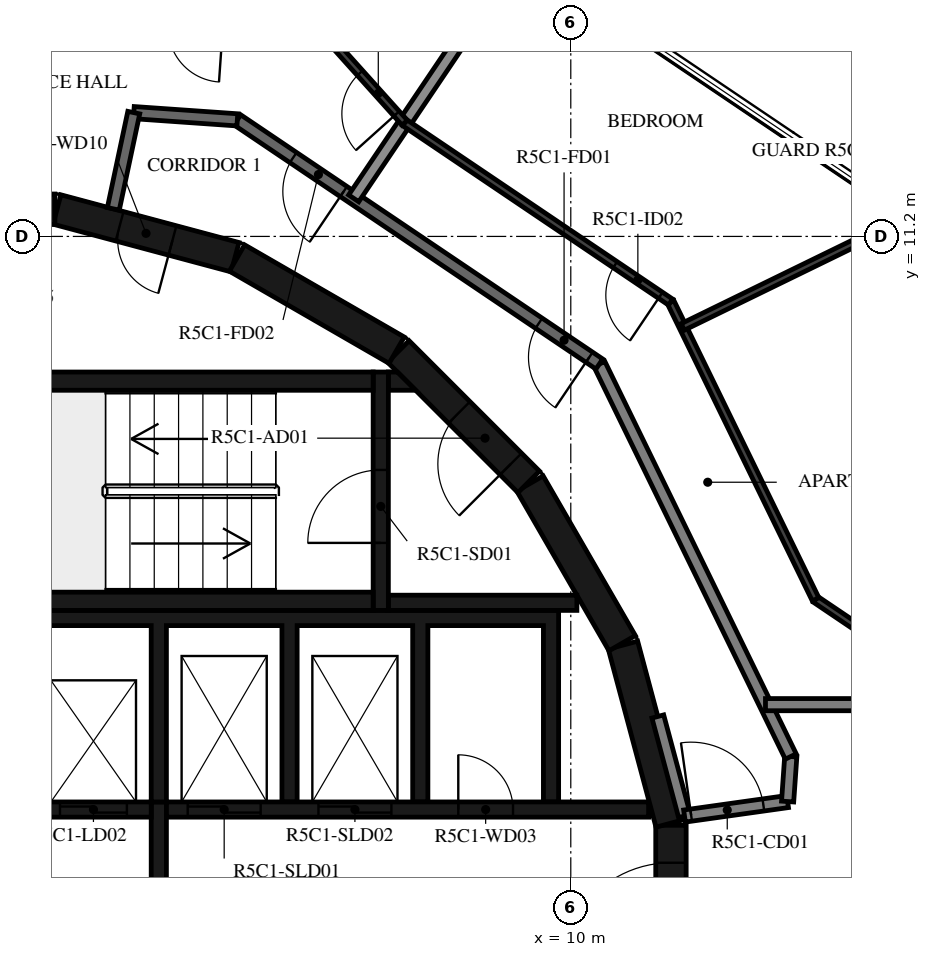
"""IFC4 building model, lengths in metres.
Left out: names, types, materials, properties, quantities, classifications, styles, units other than length and angle.
Written with IfcOpenShell. Run it as: python <this file> out.ifc"""

import sys

from ifc_helpers import new_model, si_unit, direction, frame, frame_2d, origin, place, context, subcontext, project, spatial, polyline, rectangle, outline, extrude, element, fill, save


model = new_model("IFC4")
c1 = context("Model", 3, precision=1e-05, world=origin(), true_north=direction((0.0, 1.0)))
c2 = subcontext(c1, "Body", "Model", "MODEL_VIEW")
j1 = project(units=[si_unit("LENGTHUNIT", "METRE"), si_unit("PLANEANGLEUNIT", "RADIAN")], contexts=[c1])
p1 = place(None, origin())
s1 = spatial("IfcSite", under=j1, at=p1, CompositionType="ELEMENT")
p2 = place(p1, origin())
s2 = spatial("IfcBuilding", under=s1, at=p2, CompositionType="ELEMENT")
p3 = place(p2, frame((0.0, 0.0, 212.9)))
s3 = spatial("IfcBuildingStorey", under=s2, at=p3, CompositionType="ELEMENT", Elevation=212.9)
p4 = place(p3, frame((11.647, -1.516, 0.0), z_axis=(0.0, 0.0, 1.0), x_axis=(0.0, 1.0, 0.0)))
e1 = element("IfcWall", 1, at=p4, inside=s3, PredefinedType="SHEAR", context=c2, shape_type="SweptSolid", body=[
    extrude(rectangle(XDim=3.033, YDim=0.5, at=frame_2d((1.516, 0.0))), origin(), (0.0, 0.0, 1.0), 3.12),
])
p5 = place(p4, frame((0.616, 0.0, 0.0)))
e2 = element("IfcOpeningElement", 2, at=p5, cuts=e1, PredefinedType="OPENING", context=c2, shape_type="SweptSolid", body=[
    extrude(rectangle(XDim=1.8, YDim=2.1, at=frame_2d((0.9, 1.05))), frame((0.0, 0.26, 0.0), z_axis=(0.0, -1.0, 0.0), x_axis=(1.0, 0.0, 0.0)), (0.0, 0.0, 1.0), 0.52),
])
for number, where, z_axis, x_axis in (
    (3, (11.643, 1.55, 0.0), (0.0, 0.0, 1.0), (-0.259, 0.966, 0.0)),
    (4, (10.845, 4.51, 0.0), (0.0, 0.0, 1.0), (-0.5, 0.866, 0.0)),
):
    element("IfcWall", number, at=place(p3, frame(where, z_axis=z_axis, x_axis=x_axis)), inside=s3, PredefinedType="SHEAR", context=c2, shape_type="SweptSolid", body=[
        extrude(rectangle(XDim=3.033, YDim=0.5, at=frame_2d((1.516, 0.0))), origin(), (0.0, 0.0, 1.0), 3.12),
    ])
p6 = place(p3, frame((9.308, 7.164, 0.0), z_axis=(0.0, 0.0, 1.0), x_axis=(-0.707106781187, 0.707106781187, 0.0)))
e5 = element("IfcWall", 5, at=p6, inside=s3, PredefinedType="SHEAR", context=c2, shape_type="SweptSolid", body=[
    extrude(rectangle(XDim=3.032, YDim=0.5, at=frame_2d((1.516, 0.0))), origin(), (0.0, 0.0, 1.0), 3.12),
])
p7 = place(p6, frame((0.416, 0.0, 0.0)))
e6 = element("IfcOpeningElement", 6, at=p7, cuts=e5, PredefinedType="OPENING", context=c2, shape_type="SweptSolid", body=[
    extrude(rectangle(XDim=1.2, YDim=2.1, at=frame_2d((0.6, 1.05))), frame((0.0, 0.26, 0.0), z_axis=(0.0, -1.0, 0.0), x_axis=(1.0, 0.0, 0.0)), (0.0, 0.0, 1.0), 0.52),
])
p8 = place(p3, frame((7.137, 9.329, 0.0), z_axis=(0.0, 0.0, 1.0), x_axis=(-0.865975092491, 0.500087131594, 0.0)))
e7 = element("IfcWall", 7, at=p8, inside=s3, PredefinedType="SHEAR", context=c2, shape_type="SweptSolid", body=[
    extrude(rectangle(XDim=3.033, YDim=0.5, at=frame_2d((1.516, 0.0))), origin(), (0.0, 0.0, 1.0), 3.12),
])
p9 = place(p3, frame((4.479, 10.858, 0.0), z_axis=(0.0, 0.0, 1.0), x_axis=(-0.965948410781, 0.258734743916, 0.0)))
e8 = element("IfcWall", 8, at=p9, inside=s3, PredefinedType="SHEAR", context=c2, shape_type="SweptSolid", body=[
    extrude(rectangle(XDim=3.033, YDim=0.5, at=frame_2d((1.516, 0.0))), origin(), (0.0, 0.0, 1.0), 3.12),
])
p10 = place(p9, frame((1.066, 0.0, 0.0)))
e9 = element("IfcOpeningElement", 9, at=p10, cuts=e8, PredefinedType="OPENING", context=c2, shape_type="SweptSolid", body=[
    extrude(rectangle(XDim=0.9, YDim=2.1, at=frame_2d((0.45, 1.05))), frame((0.0, 0.26, 0.0), z_axis=(0.0, -1.0, 0.0), x_axis=(1.0, 0.0, 0.0)), (0.0, 0.0, 1.0), 0.52),
])
p11 = place(p3, frame((1.516, 11.647, 0.0), z_axis=(0.0, 0.0, 1.0), x_axis=(-1.0, 0.0, 0.0)))
e10 = element("IfcWall", 10, at=p11, inside=s3, PredefinedType="SHEAR", context=c2, shape_type="SweptSolid", body=[
    extrude(rectangle(XDim=3.033, YDim=0.5, at=frame_2d((1.516, 0.0))), origin(), (0.0, 0.0, 1.0), 3.12),
])
for number, where, z_axis, x_axis in (
    (11, (0.0, 5.2, 0.0), (0.0, 0.0, 1.0), (1.0, 0.0, 0.0)),
    (12, (0.0, 8.82, 0.0), (0.0, 0.0, 1.0), (1.0, 0.0, 0.0)),
):
    element("IfcWall", number, at=place(p3, frame(where, z_axis=z_axis, x_axis=x_axis)), inside=s3, PredefinedType="SHEAR", context=c2, shape_type="SweptSolid", body=[
        extrude(rectangle(XDim=6.75, YDim=0.3, at=frame_2d((3.375, 0.0))), origin(), (0.0, 0.0, 1.0), 3.12),
    ])
p12 = place(p3, frame((6.875, 5.05, 0.0), z_axis=(0.0, 0.0, 1.0), x_axis=(0.0, 1.0, 0.0)))
e13 = element("IfcWall", 13, at=p12, inside=s3, PredefinedType="SHEAR", context=c2, shape_type="SweptSolid", body=[
    extrude(rectangle(XDim=3.92, YDim=0.25, at=frame_2d((1.96, 0.0))), origin(), (0.0, 0.0, 1.0), 3.12),
])
p13 = place(p12, frame((1.11, 0.0, 0.0)))
e14 = element("IfcOpeningElement", 14, at=p13, cuts=e13, PredefinedType="OPENING", context=c2, shape_type="SweptSolid", body=[
    extrude(rectangle(XDim=1.2, YDim=2.1, at=frame_2d((0.6, 1.05))), frame((0.0, 0.135, 0.0), z_axis=(0.0, -1.0, 0.0), x_axis=(1.0, 0.0, 0.0)), (0.0, 0.0, 1.0), 0.27),
])
p14 = place(p3, frame((7.0, 5.175, 0.0), z_axis=(0.0, 0.0, 1.0), x_axis=(1.0, 0.0, 0.0)))
e15 = element("IfcWall", 15, at=p14, inside=s3, PredefinedType="SHEAR", context=c2, shape_type="SweptSolid", body=[
    extrude(rectangle(XDim=3.1, YDim=0.25, at=frame_2d((1.55, 0.0))), origin(), (0.0, 0.0, 1.0), 3.12),
])
p15 = place(p3, origin())
e16 = element("IfcWall", 16, at=p15, inside=s3, PredefinedType="SHEAR", context=c2, shape_type="SweptSolid", body=[
    extrude(outline(polyline([(7.448, 8.67), (7.0, 8.67), (7.0, 8.97), (7.148, 8.97), (7.448, 8.67)])), origin(), (0.0, 0.0, 1.0), 3.12),
])
p16 = place(p3, origin())
e17 = element("IfcWall", 17, at=p16, inside=s3, PredefinedType="SHEAR", context=c2, shape_type="SweptSolid", body=[
    extrude(outline(polyline([(-9.55, 4.8), (-5.5, 4.8), (-5.5, 1.9), (-5.25, 1.9), (-5.25, 4.8), (-1.2, 4.8), (-1.2, 1.9), (-0.95, 1.9), (-0.95, 4.8), (0.95, 4.8), (0.95, 1.9), (1.2, 1.9), (1.2, 4.8), (3.1, 4.8), (3.1, 1.9), (3.35, 1.9), (3.35, 4.8), (5.25, 4.8), (5.25, 1.9), (5.5, 1.9), (5.5, 4.8), (7.4, 4.8), (7.4, 1.9), (7.65, 1.9), (7.65, 4.8), (9.55, 4.8), (9.55, 1.9), (9.8, 1.9), (9.8, 4.8), (9.8, 5.05), (-9.8, 5.05), (-9.8, 4.8), (-9.8, 1.9), (-9.55, 1.9), (-9.55, 4.8)])), origin(), (0.0, 0.0, 1.0), 3.12),
])
p17 = place(p3, frame((-11.28, 1.775, 0.0), z_axis=(0.0, 0.0, 1.0), x_axis=(1.0, 0.0, 0.0)))
e18 = element("IfcWall", 18, at=p17, inside=s3, PredefinedType="SHEAR", context=c2, shape_type="SweptSolid", body=[
    extrude(rectangle(XDim=14.38, YDim=0.25, at=frame_2d((7.19, 0.0))), origin(), (0.0, 0.0, 1.0), 3.12),
])
p18 = place(p17, frame((10.73, 0.0, 0.0)))
e19 = element("IfcOpeningElement", 19, at=p18, cuts=e18, PredefinedType="OPENING", context=c2, shape_type="SweptSolid", body=[
    extrude(rectangle(XDim=1.1, YDim=2.1, at=frame_2d((0.55, 1.05))), frame((0.0, 0.135, 0.0), z_axis=(0.0, -1.0, 0.0), x_axis=(1.0, 0.0, 0.0)), (0.0, 0.0, 1.0), 0.27),
])
p19 = place(p17, frame((12.88, 0.0, 0.0)))
e20 = element("IfcOpeningElement", 20, at=p19, cuts=e18, PredefinedType="OPENING", context=c2, shape_type="SweptSolid", body=[
    extrude(rectangle(XDim=1.1, YDim=2.1, at=frame_2d((0.55, 1.05))), frame((0.0, 0.135, 0.0), z_axis=(0.0, -1.0, 0.0), x_axis=(1.0, 0.0, 0.0)), (0.0, 0.0, 1.0), 0.27),
])
p20 = place(p17, frame((3.305, 0.0, 0.0)))
e21 = element("IfcOpeningElement", 21, at=p20, cuts=e18, PredefinedType="OPENING", context=c2, shape_type="SweptSolid", body=[
    extrude(rectangle(XDim=0.9, YDim=2.1, at=frame_2d((0.45, 1.05))), frame((0.0, 0.135, 0.0), z_axis=(0.0, -1.0, 0.0), x_axis=(1.0, 0.0, 0.0)), (0.0, 0.0, 1.0), 0.27),
])
p21 = place(p17, frame((7.605, 0.0, 0.0)))
e22 = element("IfcOpeningElement", 22, at=p21, cuts=e18, PredefinedType="OPENING", context=c2, shape_type="SweptSolid", body=[
    extrude(rectangle(XDim=0.9, YDim=2.1, at=frame_2d((0.45, 1.05))), frame((0.0, 0.135, 0.0), z_axis=(0.0, -1.0, 0.0), x_axis=(1.0, 0.0, 0.0)), (0.0, 0.0, 1.0), 0.27),
])
p22 = place(p3, frame((3.35, 1.775, 0.0), z_axis=(0.0, 0.0, 1.0), x_axis=(1.0, 0.0, 0.0)))
e23 = element("IfcWall", 23, at=p22, inside=s3, PredefinedType="SHEAR", context=c2, shape_type="SweptSolid", body=[
    extrude(rectangle(XDim=7.93, YDim=0.25, at=frame_2d((3.965, 0.0))), origin(), (0.0, 0.0, 1.0), 3.12),
])
p23 = place(p22, frame((0.35, 0.0, 0.0)))
e24 = element("IfcOpeningElement", 24, at=p23, cuts=e23, PredefinedType="OPENING", context=c2, shape_type="SweptSolid", body=[
    extrude(rectangle(XDim=1.2, YDim=2.4, at=frame_2d((0.6, 1.2))), frame((0.0, 0.135, 0.0), z_axis=(0.0, -1.0, 0.0), x_axis=(1.0, 0.0, 0.0)), (0.0, 0.0, 1.0), 0.27),
])
p24 = place(p22, frame((2.5, 0.0, 0.0)))
e25 = element("IfcOpeningElement", 25, at=p24, cuts=e23, PredefinedType="OPENING", context=c2, shape_type="SweptSolid", body=[
    extrude(rectangle(XDim=1.2, YDim=2.4, at=frame_2d((0.6, 1.2))), frame((0.0, 0.135, 0.0), z_axis=(0.0, -1.0, 0.0), x_axis=(1.0, 0.0, 0.0)), (0.0, 0.0, 1.0), 0.27),
])
p25 = place(p22, frame((4.8, 0.0, 0.0)))
e26 = element("IfcOpeningElement", 26, at=p25, cuts=e23, PredefinedType="OPENING", context=c2, shape_type="SweptSolid", body=[
    extrude(rectangle(XDim=0.9, YDim=2.1, at=frame_2d((0.45, 1.05))), frame((0.0, 0.135, 0.0), z_axis=(0.0, -1.0, 0.0), x_axis=(1.0, 0.0, 0.0)), (0.0, 0.0, 1.0), 0.27),
])
p26 = place(p3, frame((3.225, -1.9, 0.0), z_axis=(0.0, 0.0, 1.0), x_axis=(0.0, 1.0, 0.0)))
e27 = element("IfcWall", 27, at=p26, inside=s3, PredefinedType="SHEAR", context=c2, shape_type="SweptSolid", body=[
    extrude(rectangle(XDim=3.8, YDim=0.25, at=frame_2d((1.9, 0.0))), origin(), (0.0, 0.0, 1.0), 3.12),
])
p27 = place(p3, frame((11.87, 1.668, 0.0), z_axis=(0.0, 0.0, 1.0), x_axis=(-0.258836880648, 0.965921047093, 0.0)))
e28 = element("IfcWall", 28, at=p27, inside=s3, PredefinedType="STANDARD", context=c2, shape_type="SweptSolid", body=[
    extrude(rectangle(XDim=1.695, YDim=0.2, at=frame_2d((0.848, 0.0))), origin(), (0.0, 0.0, 1.0), 3.12),
])
p28 = place(p3, frame((11.87, 1.668, 0.0), z_axis=(0.0, 0.0, 1.0), x_axis=(0.990271931984, 0.139145609792, 0.0)))
e29 = element("IfcWall", 29, at=p28, inside=s3, PredefinedType="STANDARD", context=c2, shape_type="SweptSolid", body=[
    extrude(rectangle(XDim=1.712, YDim=0.2, at=frame_2d((0.856, 0.0))), origin(), (0.0, 0.0, 1.0), 3.12),
])
p29 = place(p28, frame((0.11, 0.0, 0.0)))
e30 = element("IfcOpeningElement", 30, at=p29, cuts=e29, PredefinedType="OPENING", context=c2, shape_type="SweptSolid", body=[
    extrude(rectangle(XDim=1.2, YDim=2.1, at=frame_2d((0.6, 1.05))), frame((0.0, 0.11, 0.0), z_axis=(0.0, -1.0, 0.0), x_axis=(1.0, 0.0, 0.0)), (0.0, 0.0, 1.0), 0.22),
])
p30 = place(p3, frame((13.566, 1.906, 0.0), z_axis=(0.0, 0.0, 1.0), x_axis=(0.07005495793, 0.997543133338, 0.0)))
e31 = element("IfcWall", 31, at=p30, inside=s3, PredefinedType="STANDARD", context=c2, shape_type="SweptSolid", body=[
    extrude(rectangle(XDim=0.742, YDim=0.2, at=frame_2d((0.371, 0.0))), origin(), (0.0, 0.0, 1.0), 3.12),
])
p31 = place(p3, frame((13.618, 2.647, 0.0), z_axis=(0.0, 0.0, 1.0), x_axis=(-0.438366026218, 0.898796543751, 0.0)))
e32 = element("IfcWall", 32, at=p31, inside=s3, PredefinedType="STANDARD", context=c2, shape_type="SweptSolid", body=[
    extrude(rectangle(XDim=7.181, YDim=0.2, at=frame_2d((3.591, 0.0))), origin(), (0.0, 0.0, 1.0), 3.12),
])
p32 = place(p3, frame((10.47, 9.101, 0.0), z_axis=(0.0, 0.0, 1.0), x_axis=(-0.829035841718, 0.559195469534, 0.0)))
e33 = element("IfcWall", 33, at=p32, inside=s3, PredefinedType="STANDARD", context=c2, shape_type="SweptSolid", body=[
    extrude(rectangle(XDim=7.181, YDim=0.2, at=frame_2d((3.591, 0.0))), origin(), (0.0, 0.0, 1.0), 3.12),
])
p33 = place(p32, frame((0.2, 0.0, 0.0)))
e34 = element("IfcOpeningElement", 34, at=p33, cuts=e33, PredefinedType="OPENING", context=c2, shape_type="SweptSolid", body=[
    extrude(rectangle(XDim=1.0, YDim=2.1, at=frame_2d((0.5, 1.05))), frame((0.0, 0.11, 0.0), z_axis=(0.0, -1.0, 0.0), x_axis=(1.0, 0.0, 0.0)), (0.0, 0.0, 1.0), 0.22),
])
p34 = place(p32, frame((5.073, 0.0, 0.0)))
e35 = element("IfcOpeningElement", 35, at=p34, cuts=e33, PredefinedType="OPENING", context=c2, shape_type="SweptSolid", body=[
    extrude(rectangle(XDim=1.0, YDim=2.1, at=frame_2d((0.5, 1.05))), frame((0.0, 0.11, 0.0), z_axis=(0.0, -1.0, 0.0), x_axis=(1.0, 0.0, 0.0)), (0.0, 0.0, 1.0), 0.22),
])
p35 = place(p3, frame((4.517, 13.117, 0.0), z_axis=(0.0, 0.0, 1.0), x_axis=(-0.997562153664, 0.069783591025, 0.0)))
e36 = element("IfcWall", 36, at=p35, inside=s3, PredefinedType="STANDARD", context=c2, shape_type="SweptSolid", body=[
    extrude(rectangle(XDim=1.707, YDim=0.2, at=frame_2d((0.854, 0.0))), origin(), (0.0, 0.0, 1.0), 3.12),
])
p36 = place(p3, frame((2.813, 13.236, 0.0), z_axis=(0.0, 0.0, 1.0), x_axis=(-0.207911086063, -0.978147729278, 0.0)))
e37 = element("IfcWall", 37, at=p36, inside=s3, PredefinedType="STANDARD", context=c2, shape_type="SweptSolid", body=[
    extrude(rectangle(XDim=1.618, YDim=0.2, at=frame_2d((0.809, 0.0))), origin(), (0.0, 0.0, 1.0), 3.12),
])
p37 = place(p3, frame((17.9, 3.5, 0.0), z_axis=(0.0, 0.0, 1.0), x_axis=(-1.0, 0.0, 0.0)))
e38 = element("IfcWall", 38, at=p37, inside=s3, PredefinedType="STANDARD", context=c2, shape_type="SweptSolid", body=[
    extrude(rectangle(XDim=4.698, YDim=0.2, at=frame_2d((2.349, 0.0))), origin(), (0.0, 0.0, 1.0), 3.12),
])
p38 = place(p3, frame((9.104, 15.79, 0.0), z_axis=(0.0, 0.0, 1.0), x_axis=(-0.559193912135, -0.829036892201, 0.0)))
e39 = element("IfcWall", 39, at=p38, inside=s3, PredefinedType="STANDARD", context=c2, shape_type="SweptSolid", body=[
    extrude(rectangle(XDim=4.781, YDim=0.2, at=frame_2d((2.39, 0.0))), origin(), (0.0, 0.0, 1.0), 2.73),
])
p39 = place(p3, frame((14.654, 4.808, 0.0), z_axis=(0.0, 0.0, 1.0), x_axis=(-0.829065184024, 0.559151965604, 0.0)))
e40 = element("IfcWall", 40, at=p39, inside=s3, PredefinedType="PARTITIONING", context=c2, shape_type="SweptSolid", body=[
    extrude(rectangle(XDim=0.758, YDim=0.12, at=frame_2d((0.379, 0.0))), origin(), (0.0, 0.0, 1.0), 3.12),
])
p40 = place(p3, frame((14.026, 5.232, 0.0), z_axis=(0.0, 0.0, 1.0), x_axis=(-0.438374985284, 0.89879217413, 0.0)))
e41 = element("IfcWall", 41, at=p40, inside=s3, PredefinedType="PARTITIONING", context=c2, shape_type="SweptSolid", body=[
    extrude(rectangle(XDim=5.438, YDim=0.12, at=frame_2d((2.719, 0.0))), origin(), (0.0, 0.0, 1.0), 3.12),
])
p41 = place(p3, frame((11.642, 10.12, 0.0), z_axis=(0.0, 0.0, 1.0), x_axis=(-0.829054664054, 0.559167563446, 0.0)))
e42 = element("IfcWall", 42, at=p41, inside=s3, PredefinedType="PARTITIONING", context=c2, shape_type="SweptSolid", body=[
    extrude(rectangle(XDim=5.275, YDim=0.12, at=frame_2d((2.637, 0.0))), origin(), (0.0, 0.0, 1.0), 3.12),
])
p42 = place(p41, frame((0.2, 0.0, 0.0)))
e43 = element("IfcOpeningElement", 43, at=p42, cuts=e42, PredefinedType="OPENING", context=c2, shape_type="SweptSolid", body=[
    extrude(rectangle(XDim=0.9, YDim=2.1, at=frame_2d((0.45, 1.05))), frame((0.0, 0.07, 0.0), z_axis=(0.0, -1.0, 0.0), x_axis=(1.0, 0.0, 0.0)), (0.0, 0.0, 1.0), 0.14),
])
p43 = place(p3, frame((15.482, 11.487, 0.0), z_axis=(0.0, 0.0, 1.0), x_axis=(-0.898807251285, -0.438344071521, 0.0)))
e44 = element("IfcWall", 44, at=p43, inside=s3, PredefinedType="PARTITIONING", context=c2, shape_type="SweptSolid", body=[
    extrude(rectangle(XDim=4.051, YDim=0.12, at=frame_2d((2.025, 0.0))), origin(), (0.0, 0.0, 1.0), 3.12),
])
p44 = place(p3, frame((7.269, 13.07, 0.0), z_axis=(0.0, 0.0, 1.0), x_axis=(-0.668495993587, 0.743715743116, 0.0)))
e45 = element("IfcWall", 45, at=p44, inside=s3, PredefinedType="PARTITIONING", context=c2, shape_type="SweptSolid", body=[
    extrude(rectangle(XDim=3.281, YDim=0.12, at=frame_2d((1.641, 0.0))), origin(), (0.0, 0.0, 1.0), 3.12),
])
p45 = place(p44, frame((0.2, 0.0, 0.0)))
e46 = element("IfcOpeningElement", 46, at=p45, cuts=e45, PredefinedType="OPENING", context=c2, shape_type="SweptSolid", body=[
    extrude(rectangle(XDim=0.9, YDim=2.1, at=frame_2d((0.45, 1.05))), frame((0.0, 0.07, 0.0), z_axis=(0.0, -1.0, 0.0), x_axis=(1.0, 0.0, 0.0)), (0.0, 0.0, 1.0), 0.14),
])
p46 = place(p13, origin())
e47 = element("IfcDoor", 47, at=p46, inside=s3, OperationType="SINGLE_SWING_LEFT", PredefinedType="DOOR", context=c2, shape_type="SweptSolid", body=[
    extrude(rectangle(XDim=1.2, YDim=2.1, at=frame_2d((0.6, 1.05))), frame((0.0, 0.025, 0.0), z_axis=(0.0, -1.0, 0.0), x_axis=(1.0, 0.0, 0.0)), (0.0, 0.0, 1.0), 0.05),
])
fill(e14, e47)
p47 = place(p7, origin())
e48 = element("IfcDoor", 48, at=p47, inside=s3, OperationType="SINGLE_SWING_RIGHT", PredefinedType="DOOR", context=c2, shape_type="SweptSolid", body=[
    extrude(rectangle(XDim=1.2, YDim=2.1, at=frame_2d((0.6, 1.05))), frame((0.0, 0.025, 0.0), z_axis=(0.0, -1.0, 0.0), x_axis=(1.0, 0.0, 0.0)), (0.0, 0.0, 1.0), 0.05),
])
fill(e6, e48)
p48 = place(p5, origin())
e49 = element("IfcDoor", 49, at=p48, inside=s3, OperationType="DOUBLE_DOOR_SINGLE_SWING", PredefinedType="DOOR", context=c2, shape_type="SweptSolid", body=[
    extrude(rectangle(XDim=1.8, YDim=2.1, at=frame_2d((0.9, 1.05))), frame((0.0, 0.025, 0.0), z_axis=(0.0, -1.0, 0.0), x_axis=(1.0, 0.0, 0.0)), (0.0, 0.0, 1.0), 0.05),
])
fill(e2, e49)
p49 = place(p19, origin())
e50 = element("IfcDoor", 50, at=p49, inside=s3, OperationType="DOUBLE_DOOR_SLIDING", PredefinedType="DOOR", context=c2, shape_type="SweptSolid", body=[
    extrude(rectangle(XDim=1.1, YDim=2.1, at=frame_2d((0.55, 1.05))), frame((0.0, 0.025, 0.0), z_axis=(0.0, -1.0, 0.0), x_axis=(1.0, 0.0, 0.0)), (0.0, 0.0, 1.0), 0.05),
])
fill(e20, e50)
p50 = place(p23, origin())
e51 = element("IfcDoor", 51, at=p50, inside=s3, OperationType="DOUBLE_DOOR_SLIDING", PredefinedType="DOOR", context=c2, shape_type="SweptSolid", body=[
    extrude(rectangle(XDim=1.2, YDim=2.4, at=frame_2d((0.6, 1.2))), frame((0.0, 0.025, 0.0), z_axis=(0.0, -1.0, 0.0), x_axis=(1.0, 0.0, 0.0)), (0.0, 0.0, 1.0), 0.05),
])
fill(e24, e51)
p51 = place(p24, origin())
e52 = element("IfcDoor", 52, at=p51, inside=s3, OperationType="DOUBLE_DOOR_SLIDING", PredefinedType="DOOR", context=c2, shape_type="SweptSolid", body=[
    extrude(rectangle(XDim=1.2, YDim=2.4, at=frame_2d((0.6, 1.2))), frame((0.0, 0.025, 0.0), z_axis=(0.0, -1.0, 0.0), x_axis=(1.0, 0.0, 0.0)), (0.0, 0.0, 1.0), 0.05),
])
fill(e25, e52)
p52 = place(p25, origin())
e53 = element("IfcDoor", 53, at=p52, inside=s3, OperationType="SINGLE_SWING_LEFT", PredefinedType="DOOR", context=c2, shape_type="SweptSolid", body=[
    extrude(rectangle(XDim=0.9, YDim=2.1, at=frame_2d((0.45, 1.05))), frame((0.0, 0.025, 0.0), z_axis=(0.0, -1.0, 0.0), x_axis=(1.0, 0.0, 0.0)), (0.0, 0.0, 1.0), 0.05),
])
fill(e26, e53)
p53 = place(p10, origin())
e54 = element("IfcDoor", 54, at=p53, inside=s3, OperationType="SINGLE_SWING_RIGHT", PredefinedType="DOOR", context=c2, shape_type="SweptSolid", body=[
    extrude(rectangle(XDim=0.9, YDim=2.1, at=frame_2d((0.45, 1.05))), frame((0.0, 0.025, 0.0), z_axis=(0.0, -1.0, 0.0), x_axis=(1.0, 0.0, 0.0)), (0.0, 0.0, 1.0), 0.05),
])
fill(e9, e54)
p54 = place(p33, origin())
e55 = element("IfcDoor", 55, at=p54, inside=s3, OperationType="SINGLE_SWING_LEFT", PredefinedType="DOOR", context=c2, shape_type="SweptSolid", body=[
    extrude(rectangle(XDim=1.0, YDim=2.1, at=frame_2d((0.5, 1.05))), frame((0.0, 0.025, 0.0), z_axis=(0.0, -1.0, 0.0), x_axis=(1.0, 0.0, 0.0)), (0.0, 0.0, 1.0), 0.05),
])
fill(e34, e55)
p55 = place(p42, origin())
e56 = element("IfcDoor", 56, at=p55, inside=s3, OperationType="SINGLE_SWING_LEFT", PredefinedType="DOOR", context=c2, shape_type="SweptSolid", body=[
    extrude(rectangle(XDim=0.9, YDim=2.1, at=frame_2d((0.45, 1.05))), frame((0.0, 0.025, 0.0), z_axis=(0.0, -1.0, 0.0), x_axis=(1.0, 0.0, 0.0)), (0.0, 0.0, 1.0), 0.05),
])
fill(e43, e56)
p56 = place(p34, origin())
e57 = element("IfcDoor", 57, at=p56, inside=s3, OperationType="SINGLE_SWING_RIGHT", PredefinedType="DOOR", context=c2, shape_type="SweptSolid", body=[
    extrude(rectangle(XDim=1.0, YDim=2.1, at=frame_2d((0.5, 1.05))), frame((0.0, 0.025, 0.0), z_axis=(0.0, -1.0, 0.0), x_axis=(1.0, 0.0, 0.0)), (0.0, 0.0, 1.0), 0.05),
])
fill(e35, e57)
p57 = place(p45, origin())
e58 = element("IfcDoor", 58, at=p57, inside=s3, OperationType="SINGLE_SWING_RIGHT", PredefinedType="DOOR", context=c2, shape_type="SweptSolid", body=[
    extrude(rectangle(XDim=0.9, YDim=2.1, at=frame_2d((0.45, 1.05))), frame((0.0, 0.025, 0.0), z_axis=(0.0, -1.0, 0.0), x_axis=(1.0, 0.0, 0.0)), (0.0, 0.0, 1.0), 0.05),
])
fill(e46, e58)
p58 = place(p29, origin())
e59 = element("IfcDoor", 59, at=p58, inside=s3, OperationType="DOUBLE_DOOR_SINGLE_SWING", PredefinedType="DOOR", context=c2, shape_type="SweptSolid", body=[
    extrude(rectangle(XDim=1.2, YDim=2.1, at=frame_2d((0.6, 1.05))), frame((0.0, 0.025, 0.0), z_axis=(0.0, -1.0, 0.0), x_axis=(1.0, 0.0, 0.0)), (0.0, 0.0, 1.0), 0.05),
])
fill(e30, e59)
save(model, sys.argv[1])
